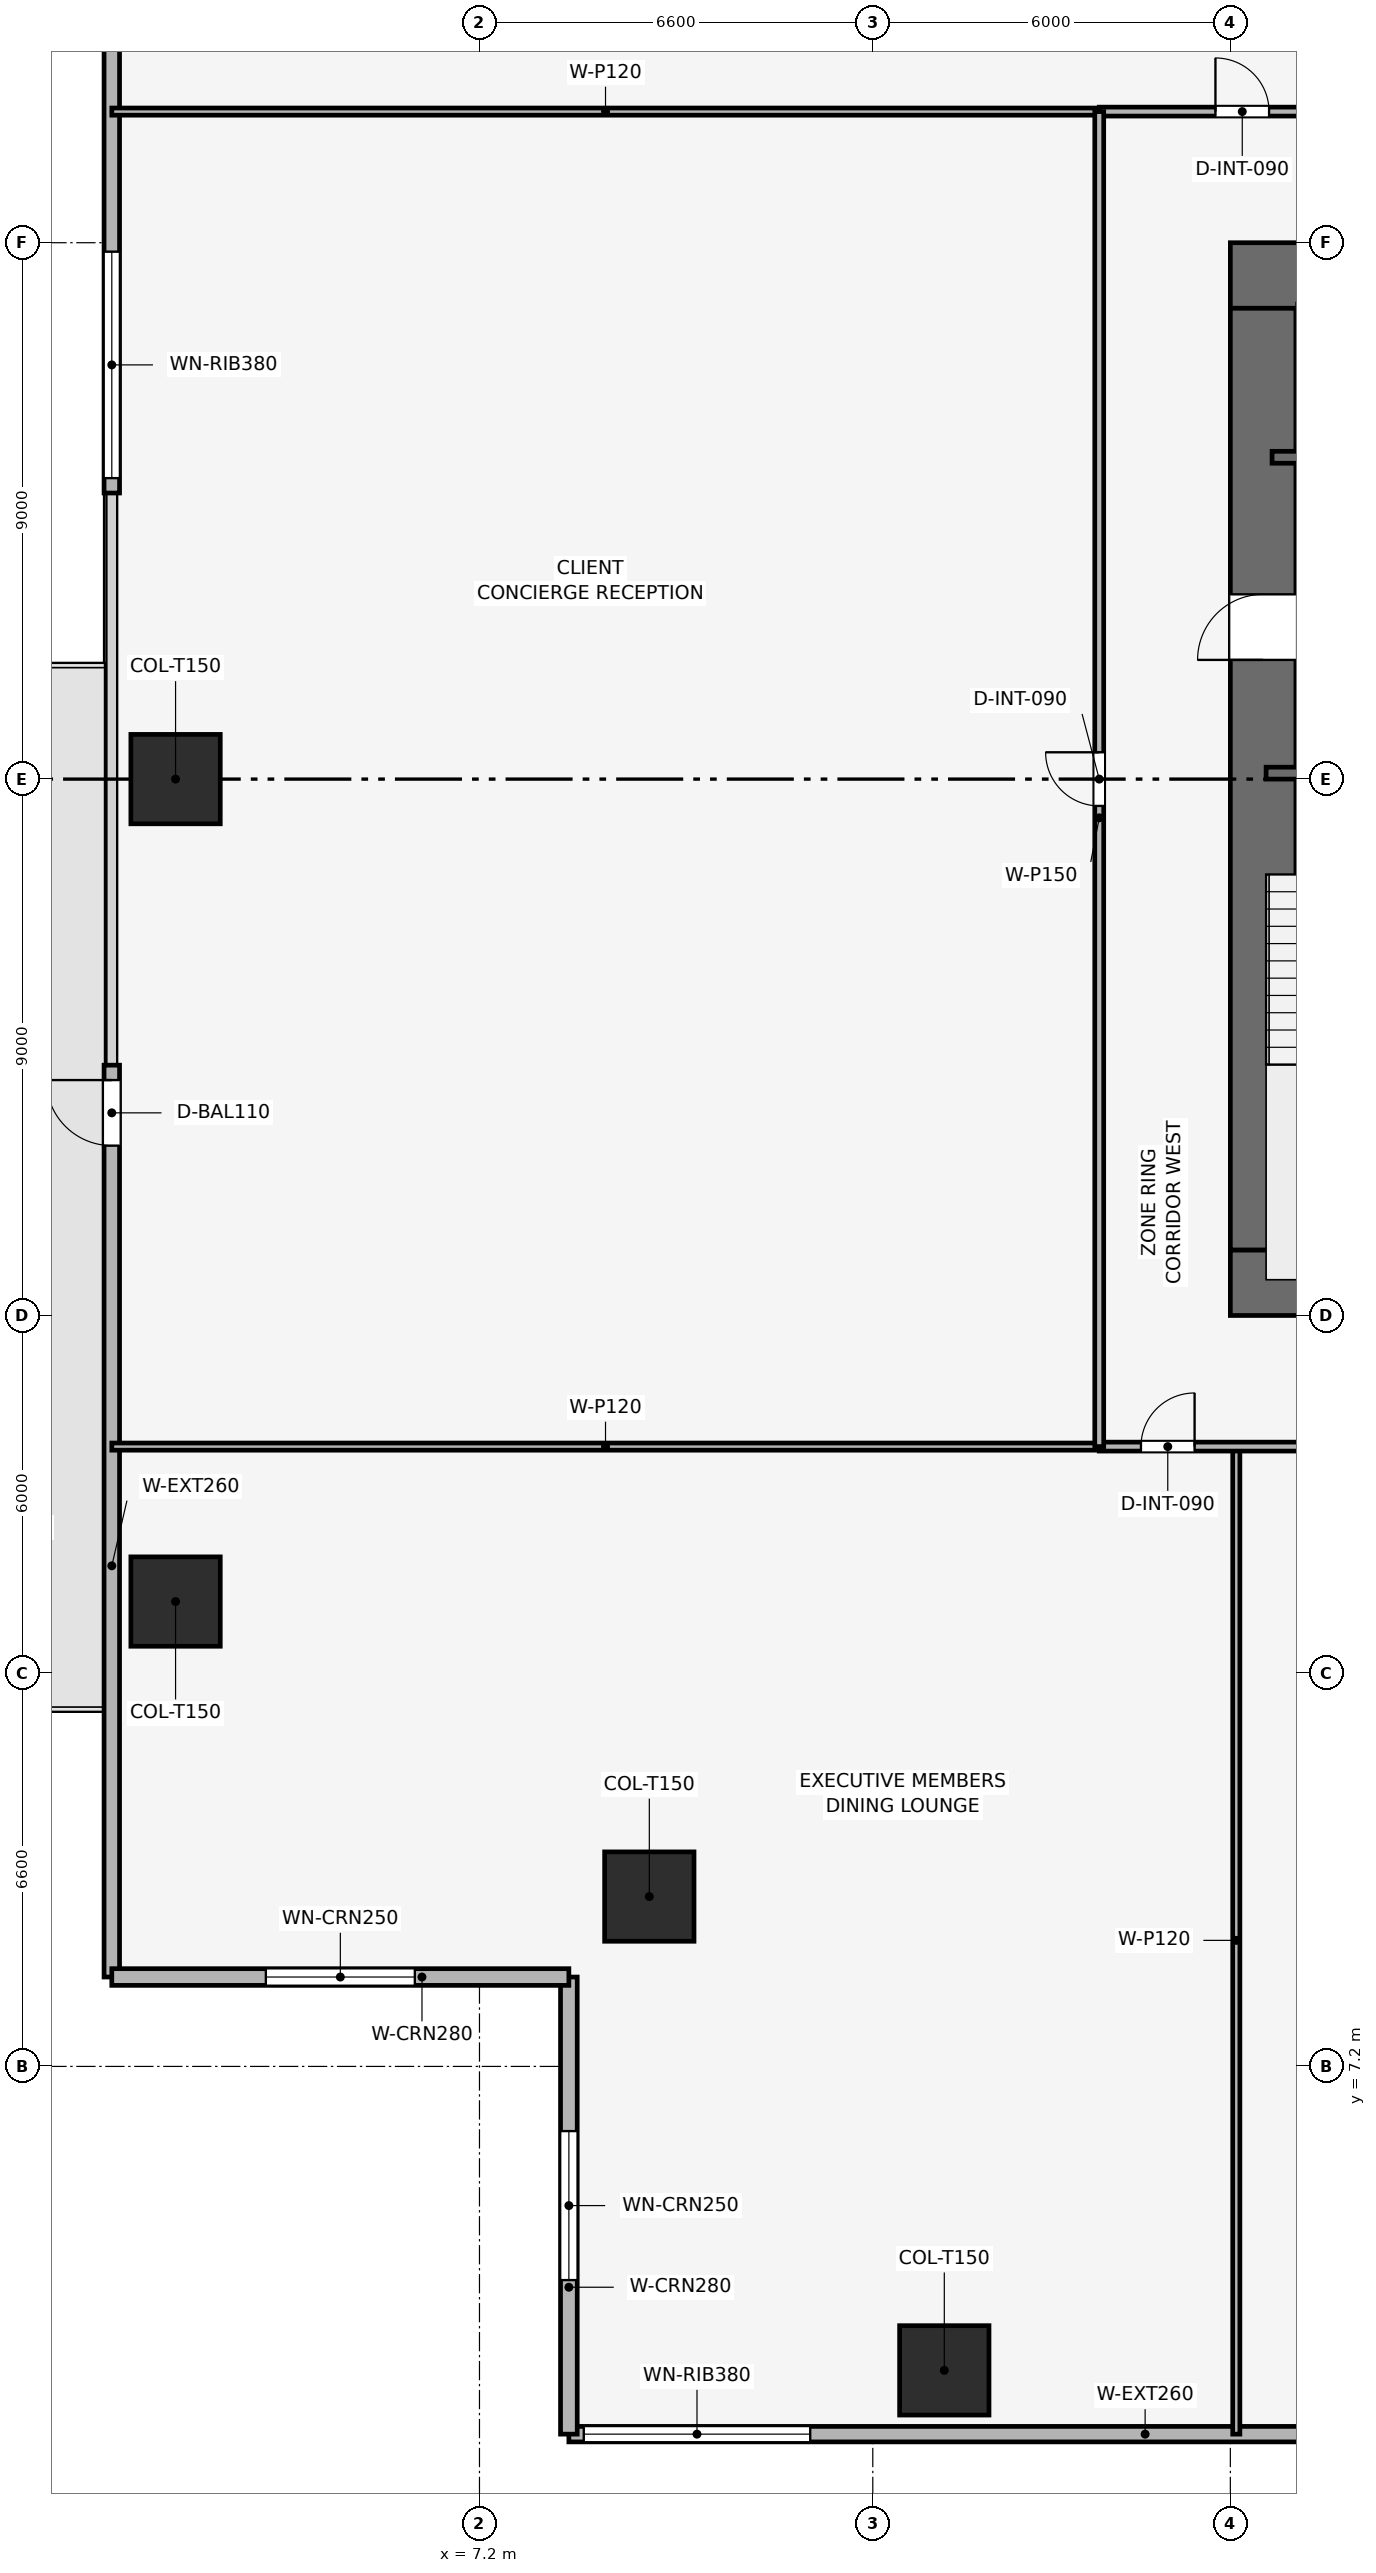
"""IFC4 building model, lengths in metres.
Left out: names, types, materials, properties, quantities, classifications, styles, units other than length and angle.
Written with IfcOpenShell. Run it as: python <this file> out.ifc"""

import sys

from ifc_helpers import new_model, si_unit, direction, frame, frame_2d, origin, origin_2d, place, context, subcontext, project, spatial, rectangle, extrude, element, fill, save


model = new_model("IFC4")
c1 = context("Model", 3, precision=1e-05, world=origin(), true_north=direction((0.0, 1.0)))
c2 = subcontext(c1, "Body", "Model", "MODEL_VIEW")
j1 = project(units=[si_unit("LENGTHUNIT", "METRE"), si_unit("PLANEANGLEUNIT", "RADIAN")], contexts=[c1])
p1 = place(None, origin())
s1 = spatial("IfcSite", under=j1, at=p1, CompositionType="ELEMENT")
p2 = place(p1, origin())
s2 = spatial("IfcBuilding", under=s1, at=p2, CompositionType="ELEMENT")
p3 = place(p2, frame((0.0, 0.0, 96.3)))
s3 = spatial("IfcBuildingStorey", under=s2, at=p3, CompositionType="ELEMENT", Elevation=96.3)
p4 = place(p3, frame((19.8, 20.35, 0.0), z_axis=(0.0, 0.0, 1.0), x_axis=(1.0, 0.0, 0.0)))
e1 = element("IfcWall", 1, at=p4, inside=s3, PredefinedType="SHEAR", context=c2, shape_type="SweptSolid", body=[
    extrude(rectangle(XDim=18.0, YDim=1.1, at=frame_2d((9.0, 0.0))), origin(), (0.0, 0.0, 1.0), 3.9),
])
p5 = place(p4, frame((8.4, 0.0, 0.0)))
e2 = element("IfcOpeningElement", 2, at=p5, cuts=e1, PredefinedType="OPENING", context=c2, shape_type="SweptSolid", body=[
    extrude(rectangle(XDim=1.2, YDim=2.2, at=frame_2d((0.6, 1.1))), frame((0.0, 0.56, 0.0), z_axis=(0.0, -1.0, 0.0), x_axis=(1.0, 0.0, 0.0)), (0.0, 0.0, 1.0), 1.12),
])
p6 = place(p3, frame((19.8, 37.25, 0.0), z_axis=(0.0, 0.0, 1.0), x_axis=(1.0, 0.0, 0.0)))
e3 = element("IfcWall", 3, at=p6, inside=s3, PredefinedType="SHEAR", context=c2, shape_type="SweptSolid", body=[
    extrude(rectangle(XDim=18.0, YDim=1.1, at=frame_2d((9.0, 0.0))), origin(), (0.0, 0.0, 1.0), 3.9),
])
p7 = place(p6, frame((7.05, 0.0, 0.0)))
e4 = element("IfcOpeningElement", 4, at=p7, cuts=e3, PredefinedType="OPENING", context=c2, shape_type="SweptSolid", body=[
    extrude(rectangle(XDim=1.1, YDim=2.15, at=frame_2d((0.55, 1.075))), frame((0.0, 0.56, 0.0), z_axis=(0.0, -1.0, 0.0), x_axis=(1.0, 0.0, 0.0)), (0.0, 0.0, 1.0), 1.12),
])
p8 = place(p3, frame((20.35, 20.9, 0.0), z_axis=(0.0, 0.0, 1.0), x_axis=(0.0, 1.0, 0.0)))
e5 = element("IfcWall", 5, at=p8, inside=s3, PredefinedType="SHEAR", context=c2, shape_type="SweptSolid", body=[
    extrude(rectangle(XDim=15.8, YDim=1.1, at=frame_2d((7.9, 0.0))), origin(), (0.0, 0.0, 1.0), 3.9),
])
p9 = place(p8, frame((9.9, 0.0, 0.0)))
e6 = element("IfcOpeningElement", 6, at=p9, cuts=e5, PredefinedType="OPENING", context=c2, shape_type="SweptSolid", body=[
    extrude(rectangle(XDim=1.1, YDim=2.15, at=frame_2d((0.55, 1.075))), frame((0.0, 0.56, 0.0), z_axis=(0.0, -1.0, 0.0), x_axis=(1.0, 0.0, 0.0)), (0.0, 0.0, 1.0), 1.12),
])
for number, where, z_axis, x_axis in (
    (7, (15.0, 2.1, 0.003), (0.0, 0.0, 1.0), (1.0, 0.0, 0.0)),
    (8, (2.1, 28.8, 0.003), (0.0, 0.0, 1.0), (1.0, 0.0, 0.0)),
    (9, (2.1, 15.0, 0.003), (0.0, 0.0, 1.0), (1.0, 0.0, 0.0)),
    (10, (10.05, 10.05, 0.003), (0.0, 0.0, 1.0), (1.0, 0.0, 0.0)),
):
    element("IfcColumn", number, at=place(p3, frame(where, z_axis=z_axis, x_axis=x_axis)), inside=s3, PredefinedType="COLUMN", context=c2, shape_type="SweptSolid", body=[
        extrude(rectangle(XDim=1.5, YDim=1.5, at=origin_2d()), origin(), (0.0, 0.0, 1.0), 3.644),
    ])
p10 = place(p3, frame((24.0, 1.03, 0.0), z_axis=(0.0, 0.0, 1.0), x_axis=(-1.0, 0.0, 0.0)))
e11 = element("IfcWall", 11, at=p10, inside=s3, PredefinedType="SOLIDWALL", context=c2, shape_type="SweptSolid", body=[
    extrude(rectangle(XDim=15.3, YDim=0.26, at=frame_2d((7.65, 0.0))), origin(), (0.0, 0.0, 1.0), 3.65),
])
p11 = place(p10, frame((11.25, 0.0, 0.9)))
e12 = element("IfcOpeningElement", 12, at=p11, cuts=e11, PredefinedType="OPENING", context=c2, shape_type="SweptSolid", body=[
    extrude(rectangle(XDim=3.8, YDim=1.9, at=frame_2d((1.9, 0.95))), frame((0.0, 0.14, 0.0), z_axis=(0.0, -1.0, 0.0), x_axis=(1.0, 0.0, 0.0)), (0.0, 0.0, 1.0), 0.28),
])
p12 = place(p3, frame((1.03, 8.7, 0.0), z_axis=(0.0, 0.0, 1.0), x_axis=(0.0, 1.0, 0.0)))
e13 = element("IfcWall", 13, at=p12, inside=s3, PredefinedType="SOLIDWALL", context=c2, shape_type="SweptSolid", body=[
    extrude(rectangle(XDim=15.3, YDim=0.26, at=frame_2d((7.65, 0.0))), origin(), (0.0, 0.0, 1.0), 3.65),
])
p13 = place(p12, frame((13.95, 0.0, 0.0)))
e14 = element("IfcOpeningElement", 14, at=p13, cuts=e13, PredefinedType="OPENING", context=c2, shape_type="SweptSolid", body=[
    extrude(rectangle(XDim=1.1, YDim=2.2, at=frame_2d((0.55, 1.1))), frame((0.0, 0.14, 0.0), z_axis=(0.0, -1.0, 0.0), x_axis=(1.0, 0.0, 0.0)), (0.0, 0.0, 1.0), 0.28),
])
p14 = place(p3, frame((1.03, 33.6, 0.0), z_axis=(0.0, 0.0, 1.0), x_axis=(0.0, 1.0, 0.0)))
e15 = element("IfcWall", 15, at=p14, inside=s3, PredefinedType="SOLIDWALL", context=c2, shape_type="SweptSolid", body=[
    extrude(rectangle(XDim=15.3, YDim=0.26, at=frame_2d((7.65, 0.0))), origin(), (0.0, 0.0, 1.0), 3.65),
])
p15 = place(p14, frame((0.25, 0.0, 0.9)))
e16 = element("IfcOpeningElement", 16, at=p15, cuts=e15, PredefinedType="OPENING", context=c2, shape_type="SweptSolid", body=[
    extrude(rectangle(XDim=3.8, YDim=1.9, at=frame_2d((1.9, 0.95))), frame((0.0, 0.14, 0.0), z_axis=(0.0, -1.0, 0.0), x_axis=(1.0, 0.0, 0.0)), (0.0, 0.0, 1.0), 0.28),
])
p16 = place(p3, frame((8.7, 1.03, 0.0), z_axis=(0.0, 0.0, 1.0), x_axis=(0.0, 1.0, 0.0)))
e17 = element("IfcWall", 17, at=p16, inside=s3, PredefinedType="SOLIDWALL", context=c2, shape_type="SweptSolid", body=[
    extrude(rectangle(XDim=7.67, YDim=0.28, at=frame_2d((3.835, 0.0))), origin(), (0.0, 0.0, 1.0), 3.65),
])
p17 = place(p16, frame((2.585, 0.0, 0.9)))
e18 = element("IfcOpeningElement", 18, at=p17, cuts=e17, PredefinedType="OPENING", context=c2, shape_type="SweptSolid", body=[
    extrude(rectangle(XDim=2.5, YDim=1.9, at=frame_2d((1.25, 0.95))), frame((0.0, 0.15, 0.0), z_axis=(0.0, -1.0, 0.0), x_axis=(1.0, 0.0, 0.0)), (0.0, 0.0, 1.0), 0.3),
])
p18 = place(p3, frame((8.7, 8.7, 0.0), z_axis=(0.0, 0.0, 1.0), x_axis=(-1.0, 0.0, 0.0)))
e19 = element("IfcWall", 19, at=p18, inside=s3, PredefinedType="SOLIDWALL", context=c2, shape_type="SweptSolid", body=[
    extrude(rectangle(XDim=7.67, YDim=0.28, at=frame_2d((3.835, 0.0))), origin(), (0.0, 0.0, 1.0), 3.65),
])
p19 = place(p18, frame((2.585, 0.0, 0.9)))
e20 = element("IfcOpeningElement", 20, at=p19, cuts=e19, PredefinedType="OPENING", context=c2, shape_type="SweptSolid", body=[
    extrude(rectangle(XDim=2.5, YDim=1.9, at=frame_2d((1.25, 0.95))), frame((0.0, 0.15, 0.0), z_axis=(0.0, -1.0, 0.0), x_axis=(1.0, 0.0, 0.0)), (0.0, 0.0, 1.0), 0.3),
])
p20 = place(p3, frame((20.4, 28.9, 0.0), z_axis=(0.0, 0.0, 1.0), x_axis=(1.0, 0.0, 0.0)))
e21 = element("IfcWall", 21, at=p20, inside=s3, PredefinedType="SHEAR", context=c2, shape_type="SweptSolid", body=[
    extrude(rectangle(XDim=3.15, YDim=0.2, at=frame_2d((1.575, 0.0))), origin(), (0.0, 0.0, 1.0), 3.65),
])
p21 = place(p20, frame((0.8, 0.0, 0.0)))
e22 = element("IfcOpeningElement", 22, at=p21, cuts=e21, PredefinedType="OPENING", context=c2, shape_type="SweptSolid", body=[
    extrude(rectangle(XDim=1.0, YDim=2.1, at=frame_2d((0.5, 1.05))), frame((0.0, 0.11, 0.0), z_axis=(0.0, -1.0, 0.0), x_axis=(1.0, 0.0, 0.0)), (0.0, 0.0, 1.0), 0.22),
])
p22 = place(p3, frame((20.5, 34.2, 0.0), z_axis=(0.0, 0.0, 1.0), x_axis=(1.0, 0.0, 0.0)))
e23 = element("IfcWall", 23, at=p22, inside=s3, PredefinedType="SHEAR", context=c2, shape_type="SweptSolid", body=[
    extrude(rectangle(XDim=3.05, YDim=0.2, at=frame_2d((1.525, 0.0))), origin(), (0.0, 0.0, 1.0), 3.65),
])
p23 = place(p22, frame((0.75, 0.0, 0.0)))
e24 = element("IfcOpeningElement", 24, at=p23, cuts=e23, PredefinedType="OPENING", context=c2, shape_type="SweptSolid", body=[
    extrude(rectangle(XDim=1.1, YDim=2.15, at=frame_2d((0.55, 1.075))), frame((0.0, 0.11, 0.0), z_axis=(0.0, -1.0, 0.0), x_axis=(1.0, 0.0, 0.0)), (0.0, 0.0, 1.0), 0.22),
])
for number, where, z_axis, x_axis in (
    (25, (19.9, 1.03, 0.0), (0.0, 0.0, 1.0), (0.0, 1.0, 0.0)),
    (26, (1.03, 17.6, 0.0), (0.0, 0.0, 1.0), (1.0, 0.0, 0.0)),
    (27, (1.03, 40.0, 0.0), (0.0, 0.0, 1.0), (1.0, 0.0, 0.0)),
):
    element("IfcWall", number, at=place(p3, frame(where, z_axis=z_axis, x_axis=x_axis)), inside=s3, PredefinedType="PARTITIONING", context=c2, shape_type="SweptSolid", body=[
        extrude(rectangle(XDim=16.57, YDim=0.12, at=frame_2d((8.285, 0.0))), origin(), (0.0, 0.0, 1.0), 2.935),
    ])
p24 = place(p3, frame((17.6, 17.6, 0.0), z_axis=(0.0, 0.0, 1.0), x_axis=(1.0, 0.0, 0.0)))
e28 = element("IfcWall", 28, at=p24, inside=s3, PredefinedType="PARTITIONING", context=c2, shape_type="SweptSolid", body=[
    extrude(rectangle(XDim=22.4, YDim=0.15, at=frame_2d((11.2, 0.0))), origin(), (0.0, 0.0, 1.0), 3.085),
])
p25 = place(p24, frame((0.7, 0.0, 0.0)))
e29 = element("IfcOpeningElement", 29, at=p25, cuts=e28, PredefinedType="OPENING", context=c2, shape_type="SweptSolid", body=[
    extrude(rectangle(XDim=0.9, YDim=2.1, at=frame_2d((0.45, 1.05))), frame((0.0, 0.085, 0.0), z_axis=(0.0, -1.0, 0.0), x_axis=(1.0, 0.0, 0.0)), (0.0, 0.0, 1.0), 0.17),
])
p26 = place(p24, frame((4.94, 0.0, 0.0)))
e30 = element("IfcOpeningElement", 30, at=p26, cuts=e28, PredefinedType="OPENING", context=c2, shape_type="SweptSolid", body=[
    extrude(rectangle(XDim=0.9, YDim=2.1, at=frame_2d((0.45, 1.05))), frame((0.0, 0.085, 0.0), z_axis=(0.0, -1.0, 0.0), x_axis=(1.0, 0.0, 0.0)), (0.0, 0.0, 1.0), 0.17),
])
p27 = place(p24, frame((10.912, 0.0, 0.0)))
e31 = element("IfcOpeningElement", 31, at=p27, cuts=e28, PredefinedType="OPENING", context=c2, shape_type="SweptSolid", body=[
    extrude(rectangle(XDim=0.9, YDim=2.1, at=frame_2d((0.45, 1.05))), frame((0.0, 0.085, 0.0), z_axis=(0.0, -1.0, 0.0), x_axis=(1.0, 0.0, 0.0)), (0.0, 0.0, 1.0), 0.17),
])
p28 = place(p24, frame((17.872, 0.0, 0.0)))
e32 = element("IfcOpeningElement", 32, at=p28, cuts=e28, PredefinedType="OPENING", context=c2, shape_type="SweptSolid", body=[
    extrude(rectangle(XDim=0.9, YDim=2.1, at=frame_2d((0.45, 1.05))), frame((0.0, 0.085, 0.0), z_axis=(0.0, -1.0, 0.0), x_axis=(1.0, 0.0, 0.0)), (0.0, 0.0, 1.0), 0.17),
])
p29 = place(p3, frame((17.6, 40.0, 0.0), z_axis=(0.0, 0.0, 1.0), x_axis=(1.0, 0.0, 0.0)))
e33 = element("IfcWall", 33, at=p29, inside=s3, PredefinedType="PARTITIONING", context=c2, shape_type="SweptSolid", body=[
    extrude(rectangle(XDim=22.4, YDim=0.15, at=frame_2d((11.2, 0.0))), origin(), (0.0, 0.0, 1.0), 3.085),
])
p30 = place(p29, frame((1.95, 0.0, 0.0)))
e34 = element("IfcOpeningElement", 34, at=p30, cuts=e33, PredefinedType="OPENING", context=c2, shape_type="SweptSolid", body=[
    extrude(rectangle(XDim=0.9, YDim=2.1, at=frame_2d((0.45, 1.05))), frame((0.0, 0.085, 0.0), z_axis=(0.0, -1.0, 0.0), x_axis=(1.0, 0.0, 0.0)), (0.0, 0.0, 1.0), 0.17),
])
p31 = place(p29, frame((5.75, 0.0, 0.0)))
e35 = element("IfcOpeningElement", 35, at=p31, cuts=e33, PredefinedType="OPENING", context=c2, shape_type="SweptSolid", body=[
    extrude(rectangle(XDim=0.9, YDim=2.1, at=frame_2d((0.45, 1.05))), frame((0.0, 0.085, 0.0), z_axis=(0.0, -1.0, 0.0), x_axis=(1.0, 0.0, 0.0)), (0.0, 0.0, 1.0), 0.17),
])
p32 = place(p29, frame((8.65, 0.0, 0.0)))
e36 = element("IfcOpeningElement", 36, at=p32, cuts=e33, PredefinedType="OPENING", context=c2, shape_type="SweptSolid", body=[
    extrude(rectangle(XDim=0.9, YDim=2.1, at=frame_2d((0.45, 1.05))), frame((0.0, 0.085, 0.0), z_axis=(0.0, -1.0, 0.0), x_axis=(1.0, 0.0, 0.0)), (0.0, 0.0, 1.0), 0.17),
])
p33 = place(p29, frame((11.4, 0.0, 0.0)))
e37 = element("IfcOpeningElement", 37, at=p33, cuts=e33, PredefinedType="OPENING", context=c2, shape_type="SweptSolid", body=[
    extrude(rectangle(XDim=0.95, YDim=2.1, at=frame_2d((0.475, 1.05))), frame((0.0, 0.085, 0.0), z_axis=(0.0, -1.0, 0.0), x_axis=(1.0, 0.0, 0.0)), (0.0, 0.0, 1.0), 0.17),
])
p34 = place(p29, frame((17.35, 0.0, 0.0)))
e38 = element("IfcOpeningElement", 38, at=p34, cuts=e33, PredefinedType="OPENING", context=c2, shape_type="SweptSolid", body=[
    extrude(rectangle(XDim=0.9, YDim=2.1, at=frame_2d((0.45, 1.05))), frame((0.0, 0.085, 0.0), z_axis=(0.0, -1.0, 0.0), x_axis=(1.0, 0.0, 0.0)), (0.0, 0.0, 1.0), 0.17),
])
p35 = place(p3, frame((17.6, 17.6, 0.0), z_axis=(0.0, 0.0, 1.0), x_axis=(0.0, 1.0, 0.0)))
e39 = element("IfcWall", 39, at=p35, inside=s3, PredefinedType="PARTITIONING", context=c2, shape_type="SweptSolid", body=[
    extrude(rectangle(XDim=22.4, YDim=0.15, at=frame_2d((11.2, 0.0))), origin(), (0.0, 0.0, 1.0), 3.085),
])
p36 = place(p35, frame((10.75, 0.0, 0.0)))
e40 = element("IfcOpeningElement", 40, at=p36, cuts=e39, PredefinedType="OPENING", context=c2, shape_type="SweptSolid", body=[
    extrude(rectangle(XDim=0.9, YDim=2.1, at=frame_2d((0.45, 1.05))), frame((0.0, 0.085, 0.0), z_axis=(0.0, -1.0, 0.0), x_axis=(1.0, 0.0, 0.0)), (0.0, 0.0, 1.0), 0.17),
])
p37 = place(p11, origin())
e41 = element("IfcWindow", 41, at=p37, inside=s3, PartitioningType="SINGLE_PANEL", PredefinedType="WINDOW", context=c2, shape_type="SweptSolid", body=[
    extrude(rectangle(XDim=3.8, YDim=1.9, at=frame_2d((1.9, 0.95))), frame((0.0, 0.03, 0.0), z_axis=(0.0, -1.0, 0.0), x_axis=(1.0, 0.0, 0.0)), (0.0, 0.0, 1.0), 0.06),
])
fill(e12, e41)
p38 = place(p13, origin())
e42 = element("IfcDoor", 42, at=p38, inside=s3, OperationType="SINGLE_SWING_RIGHT", PredefinedType="DOOR", context=c2, shape_type="SweptSolid", body=[
    extrude(rectangle(XDim=1.1, YDim=2.2, at=frame_2d((0.55, 1.1))), frame((0.0, 0.025, 0.0), z_axis=(0.0, -1.0, 0.0), x_axis=(1.0, 0.0, 0.0)), (0.0, 0.0, 1.0), 0.05),
])
fill(e14, e42)
p39 = place(p15, origin())
e43 = element("IfcWindow", 43, at=p39, inside=s3, PartitioningType="SINGLE_PANEL", PredefinedType="WINDOW", context=c2, shape_type="SweptSolid", body=[
    extrude(rectangle(XDim=3.8, YDim=1.9, at=frame_2d((1.9, 0.95))), frame((0.0, 0.03, 0.0), z_axis=(0.0, -1.0, 0.0), x_axis=(1.0, 0.0, 0.0)), (0.0, 0.0, 1.0), 0.06),
])
fill(e16, e43)
p40 = place(p17, origin())
e44 = element("IfcWindow", 44, at=p40, inside=s3, PartitioningType="SINGLE_PANEL", PredefinedType="WINDOW", context=c2, shape_type="SweptSolid", body=[
    extrude(rectangle(XDim=2.5, YDim=1.9, at=frame_2d((1.25, 0.95))), frame((0.0, 0.03, 0.0), z_axis=(0.0, -1.0, 0.0), x_axis=(1.0, 0.0, 0.0)), (0.0, 0.0, 1.0), 0.06),
])
fill(e18, e44)
p41 = place(p19, origin())
e45 = element("IfcWindow", 45, at=p41, inside=s3, PartitioningType="SINGLE_PANEL", PredefinedType="WINDOW", context=c2, shape_type="SweptSolid", body=[
    extrude(rectangle(XDim=2.5, YDim=1.9, at=frame_2d((1.25, 0.95))), frame((0.0, 0.03, 0.0), z_axis=(0.0, -1.0, 0.0), x_axis=(1.0, 0.0, 0.0)), (0.0, 0.0, 1.0), 0.06),
])
fill(e20, e45)
p42 = place(p25, origin())
e46 = element("IfcDoor", 46, at=p42, inside=s3, OperationType="SINGLE_SWING_RIGHT", PredefinedType="DOOR", context=c2, shape_type="SweptSolid", body=[
    extrude(rectangle(XDim=0.9, YDim=2.1, at=frame_2d((0.45, 1.05))), frame((0.0, 0.025, 0.0), z_axis=(0.0, -1.0, 0.0), x_axis=(1.0, 0.0, 0.0)), (0.0, 0.0, 1.0), 0.05),
])
fill(e29, e46)
p43 = place(p30, origin())
e47 = element("IfcDoor", 47, at=p43, inside=s3, OperationType="SINGLE_SWING_LEFT", PredefinedType="DOOR", context=c2, shape_type="SweptSolid", body=[
    extrude(rectangle(XDim=0.9, YDim=2.1, at=frame_2d((0.45, 1.05))), frame((0.0, 0.025, 0.0), z_axis=(0.0, -1.0, 0.0), x_axis=(1.0, 0.0, 0.0)), (0.0, 0.0, 1.0), 0.05),
])
fill(e34, e47)
p44 = place(p36, origin())
e48 = element("IfcDoor", 48, at=p44, inside=s3, OperationType="SINGLE_SWING_RIGHT", PredefinedType="DOOR", context=c2, shape_type="SweptSolid", body=[
    extrude(rectangle(XDim=0.9, YDim=2.1, at=frame_2d((0.45, 1.05))), frame((0.0, 0.025, 0.0), z_axis=(0.0, -1.0, 0.0), x_axis=(1.0, 0.0, 0.0)), (0.0, 0.0, 1.0), 0.05),
])
fill(e40, e48)
p45 = place(p9, origin())
e49 = element("IfcDoor", 49, at=p45, inside=s3, OperationType="SINGLE_SWING_LEFT", PredefinedType="DOOR", context=c2, shape_type="SweptSolid", body=[
    extrude(rectangle(XDim=1.1, YDim=2.15, at=frame_2d((0.55, 1.075))), frame((0.0, 0.025, 0.0), z_axis=(0.0, -1.0, 0.0), x_axis=(1.0, 0.0, 0.0)), (0.0, 0.0, 1.0), 0.05),
])
fill(e6, e49)
save(model, sys.argv[1])
